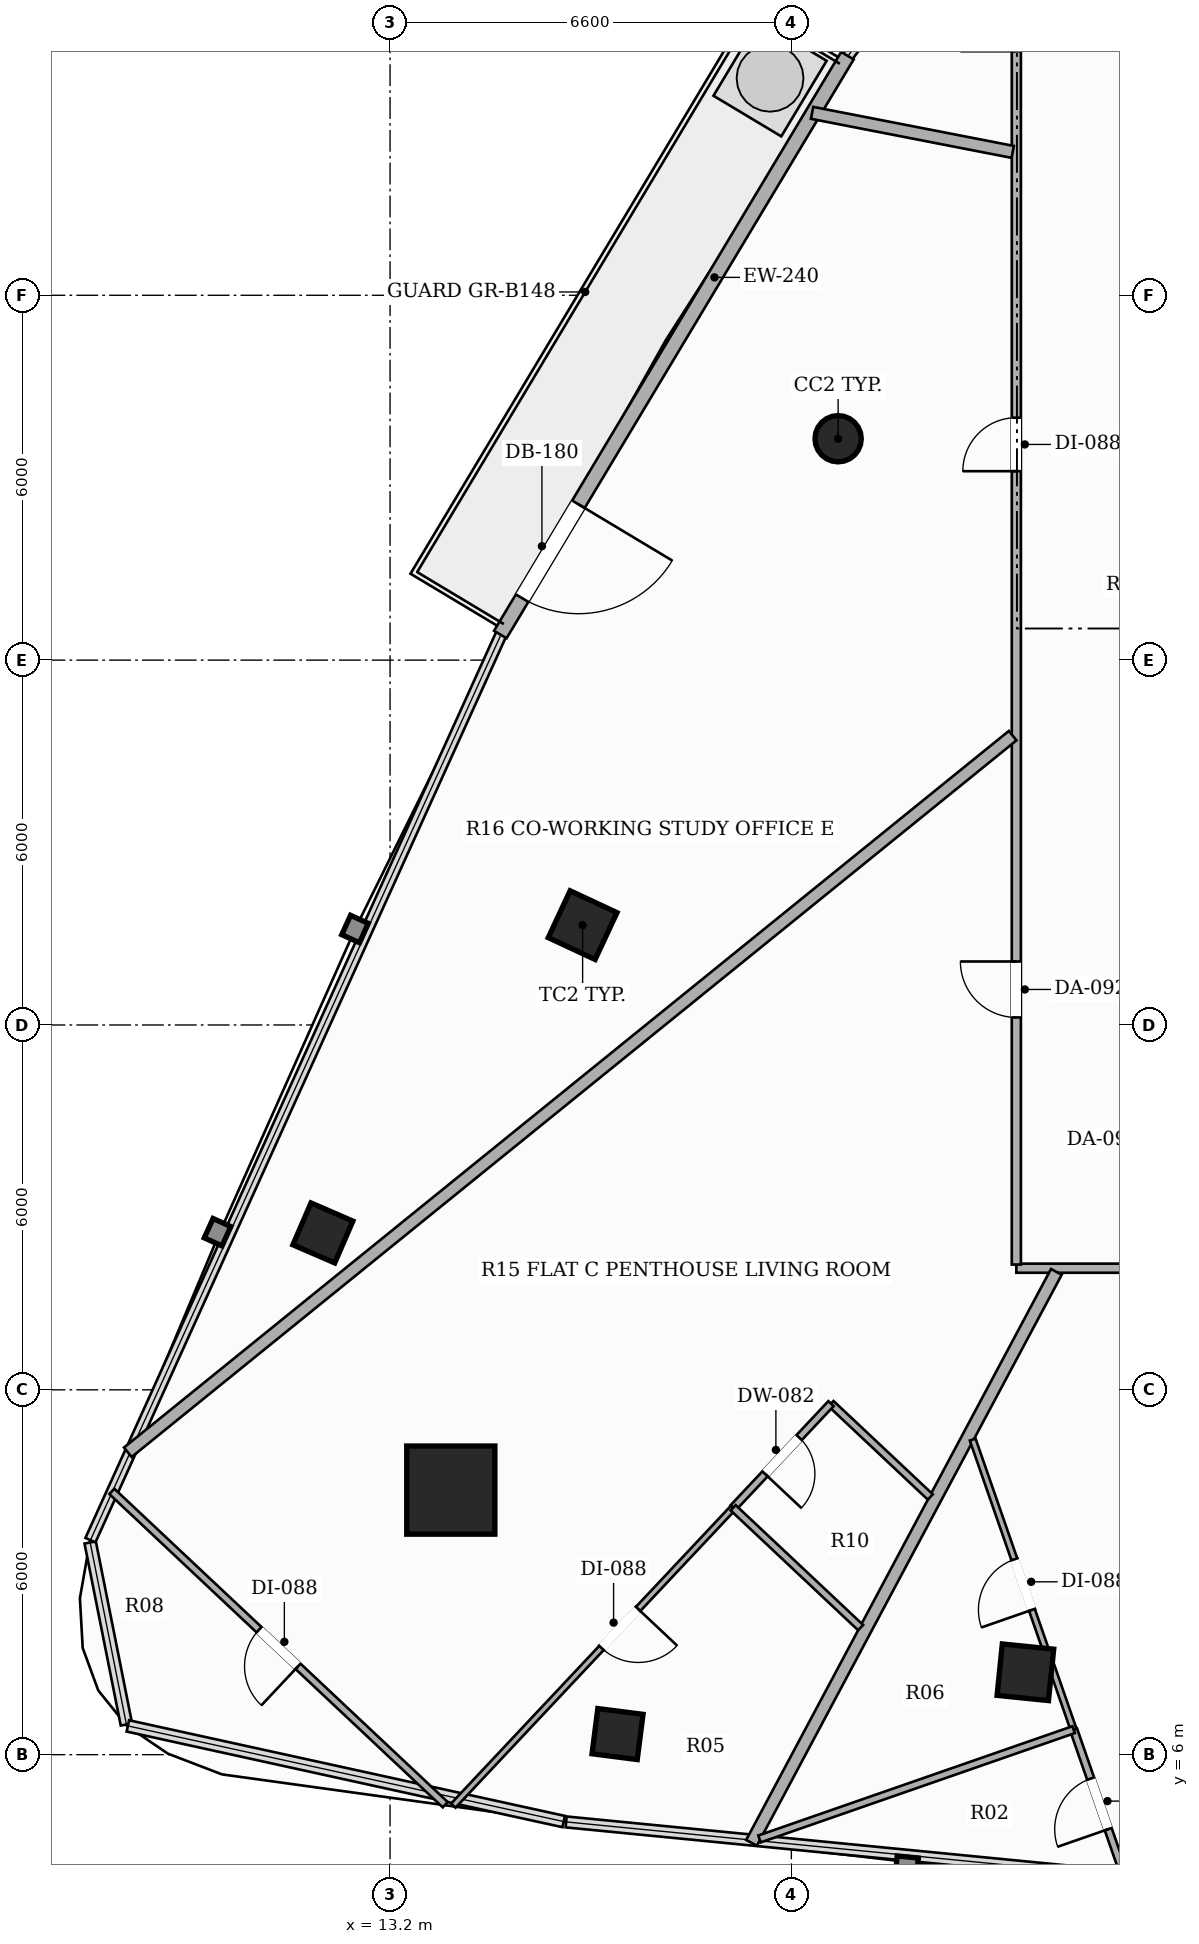
"""IFC4 building model, lengths in metres.
Left out: names, types, materials, properties, quantities, classifications, styles, units other than length and angle.
Written with IfcOpenShell. Run it as: python <this file> out.ifc"""

import sys

from ifc_helpers import new_model, si_unit, direction, frame, frame_2d, origin, origin_2d, place, context, subcontext, project, spatial, rectangle, hollow_rectangle, hollow_circle, extrude, element, fill, save


model = new_model("IFC4")
c1 = context("Model", 3, precision=1e-05, world=origin(), true_north=direction((0.0, 1.0)))
c2 = subcontext(c1, "Body", "Model", "MODEL_VIEW")
j1 = project(units=[si_unit("LENGTHUNIT", "METRE"), si_unit("PLANEANGLEUNIT", "RADIAN")], contexts=[c1])
p1 = place(None, origin())
s1 = spatial("IfcSite", under=j1, at=p1, CompositionType="ELEMENT")
p2 = place(p1, origin())
s2 = spatial("IfcBuilding", under=s1, at=p2, CompositionType="ELEMENT")
p3 = place(p2, frame((0.0, 0.0, 163.85)))
s3 = spatial("IfcBuildingStorey", under=s2, at=p3, CompositionType="ELEMENT", Elevation=163.85)
p4 = place(p3, frame((14.199, 10.351, 0.0), z_axis=(0.0, 0.0, 1.0), x_axis=(1.0, 0.0, 0.0)))
e1 = element("IfcColumn", 1, at=p4, inside=s3, PredefinedType="COLUMN", context=c2, shape_type="SweptSolid", body=[
    extrude(hollow_rectangle(XDim=1.45, YDim=1.45, WallThickness=0.045, at=origin_2d()), origin(), (0.0, 0.0, 1.0), 3.3),
])
p5 = place(p3, frame((20.569, 27.641, 0.0), z_axis=(0.0, 0.0, 1.0), x_axis=(1.0, 0.0, 0.0)))
e2 = element("IfcColumn", 2, at=p5, inside=s3, PredefinedType="COLUMN", context=c2, shape_type="SweptSolid", body=[
    extrude(hollow_circle(Radius=0.381, WallThickness=0.022, at=origin_2d()), origin(), (0.0, 0.0, 1.0), 3.3),
])
for number, where, z_axis, x_axis in (
    (3, (16.367, 19.642, 0.0), (0.0, 0.0, 1.0), (0.423, 0.906, 0.0)),
    (4, (23.649, 7.355, 0.0), (0.0, 0.0, 1.0), (-0.995, 0.101, 0.0)),
):
    element("IfcColumn", number, at=place(p3, frame(where, z_axis=z_axis, x_axis=x_axis)), inside=s3, PredefinedType="COLUMN", context=c2, shape_type="SweptSolid", body=[
        extrude(hollow_rectangle(XDim=0.85, YDim=0.85, WallThickness=0.028, at=origin_2d()), origin(), (0.0, 0.0, 1.0), 3.3),
    ])
for number, where, z_axis, x_axis in (
    (5, (12.095, 14.58, 0.0), (0.0, 0.0, 1.0), (0.397, 0.918, 0.0)),
    (6, (16.941, 6.339, 0.0), (0.0, 0.0, 1.0), (-0.992, 0.127, 0.0)),
):
    element("IfcColumn", number, at=place(p3, frame(where, z_axis=z_axis, x_axis=x_axis)), inside=s3, PredefinedType="COLUMN", context=c2, shape_type="SweptSolid", body=[
        extrude(hollow_rectangle(XDim=0.75, YDim=0.75, WallThickness=0.025, at=origin_2d()), origin(), (0.0, 0.0, 1.0), 3.3),
    ])
p6 = place(p3, frame((20.722, 33.94, 0.0), z_axis=(0.0, 0.0, 1.0), x_axis=(-0.514334017412, -0.85758994778, 0.0)))
e7 = element("IfcWall", 7, at=p6, inside=s3, PredefinedType="SOLIDWALL", context=c2, shape_type="SweptSolid", body=[
    extrude(rectangle(XDim=11.1, YDim=0.24, at=frame_2d((5.55, 0.0))), origin(), (0.0, 0.0, 1.0), 2.624),
])
p7 = place(p6, frame((8.602, 0.0, 0.0)))
e8 = element("IfcOpeningElement", 8, at=p7, cuts=e7, PredefinedType="OPENING", context=c2, shape_type="SweptSolid", body=[
    extrude(rectangle(XDim=1.8, YDim=2.2, at=frame_2d((0.9, 1.1))), frame((0.0, 0.13, 0.0), z_axis=(0.0, -1.0, 0.0), x_axis=(1.0, 0.0, 0.0)), (0.0, 0.0, 1.0), 0.26),
])
p8 = place(p3, frame((26.09, 14.0, 0.0), z_axis=(0.0, 0.0, 1.0), x_axis=(-1.0, 0.0, 0.0)))
e9 = element("IfcWall", 9, at=p8, inside=s3, PredefinedType="PARTITIONING", context=c2, shape_type="SweptSolid", body=[
    extrude(rectangle(XDim=2.59, YDim=0.15, at=frame_2d((1.295, 0.0))), origin(), (0.0, 0.0, 1.0), 2.721),
])
p9 = place(p3, frame((23.5, 14.06, 0.0), z_axis=(0.0, 0.0, 1.0), x_axis=(0.0, 1.0, 0.0)))
e10 = element("IfcWall", 10, at=p9, inside=s3, PredefinedType="PARTITIONING", context=c2, shape_type="SweptSolid", body=[
    extrude(rectangle(XDim=22.84, YDim=0.15, at=frame_2d((11.42, 0.0))), origin(), (0.0, 0.0, 1.0), 2.413),
])
p10 = place(p9, frame((4.064, 0.0, 0.0)))
e11 = element("IfcOpeningElement", 11, at=p10, cuts=e10, PredefinedType="OPENING", context=c2, shape_type="SweptSolid", body=[
    extrude(rectangle(XDim=0.92, YDim=2.15, at=frame_2d((0.46, 1.075))), frame((0.0, 0.085, 0.0), z_axis=(0.0, -1.0, 0.0), x_axis=(1.0, 0.0, 0.0)), (0.0, 0.0, 1.0), 0.17),
])
p11 = place(p9, frame((13.047, 0.0, 0.0)))
e12 = element("IfcOpeningElement", 12, at=p11, cuts=e10, PredefinedType="OPENING", context=c2, shape_type="SweptSolid", body=[
    extrude(rectangle(XDim=0.88, YDim=2.1, at=frame_2d((0.44, 1.05))), frame((0.0, 0.085, 0.0), z_axis=(0.0, -1.0, 0.0), x_axis=(1.0, 0.0, 0.0)), (0.0, 0.0, 1.0), 0.17),
])
p12 = place(p9, frame((19.953, 0.0, 0.0)))
e13 = element("IfcOpeningElement", 13, at=p12, cuts=e10, PredefinedType="OPENING", context=c2, shape_type="SweptSolid", body=[
    extrude(rectangle(XDim=0.92, YDim=2.15, at=frame_2d((0.46, 1.075))), frame((0.0, 0.085, 0.0), z_axis=(0.0, -1.0, 0.0), x_axis=(1.0, 0.0, 0.0)), (0.0, 0.0, 1.0), 0.17),
])
p13 = place(p3, frame((19.145, 4.55, 0.0), z_axis=(0.0, 0.0, 1.0), x_axis=(0.470953669838, 0.882157945533, 0.0)))
e14 = element("IfcWall", 14, at=p13, inside=s3, PredefinedType="PARTITIONING", context=c2, shape_type="SweptSolid", body=[
    extrude(rectangle(XDim=10.644, YDim=0.2, at=frame_2d((5.322, 0.0))), origin(), (0.0, 0.0, 1.0), 2.413),
])
p14 = place(p3, frame((8.887, 10.973, 0.0), z_axis=(0.0, 0.0, 1.0), x_axis=(0.777135864284, 0.629332859815, 0.0)))
e15 = element("IfcWall", 15, at=p14, inside=s3, PredefinedType="PARTITIONING", context=c2, shape_type="SweptSolid", body=[
    extrude(rectangle(XDim=18.726, YDim=0.2, at=frame_2d((9.363, 0.0))), origin(), (0.0, 0.0, 1.0), 2.413),
])
p15 = place(p3, frame((20.141, 33.0, 0.0), z_axis=(0.0, 0.0, 1.0), x_axis=(0.981579076432, -0.191056318163, 0.0)))
e16 = element("IfcWall", 16, at=p15, inside=s3, PredefinedType="PARTITIONING", context=c2, shape_type="SweptSolid", body=[
    extrude(rectangle(XDim=3.361, YDim=0.2, at=frame_2d((1.68, 0.0))), origin(), (0.0, 0.0, 1.0), 2.413),
])
p16 = place(p3, frame((25.291, 3.969, 0.0), z_axis=(0.0, 0.0, 1.0), x_axis=(-0.328440044658, 0.944524820778, 0.0)))
e17 = element("IfcWall", 17, at=p16, inside=s3, PredefinedType="PARTITIONING", context=c2, shape_type="SweptSolid", body=[
    extrude(rectangle(XDim=2.585, YDim=0.12, at=frame_2d((1.292, 0.0))), origin(), (0.0, 0.0, 1.0), 3.06),
])
p17 = place(p16, frame((0.853, 0.0, 0.0)))
e18 = element("IfcOpeningElement", 18, at=p17, cuts=e17, PredefinedType="OPENING", context=c2, shape_type="SweptSolid", body=[
    extrude(rectangle(XDim=0.88, YDim=2.1, at=frame_2d((0.44, 1.05))), frame((0.0, 0.07, 0.0), z_axis=(0.0, -1.0, 0.0), x_axis=(1.0, 0.0, 0.0)), (0.0, 0.0, 1.0), 0.14),
])
p18 = place(p3, frame((24.442, 6.411, 0.0), z_axis=(0.0, 0.0, 1.0), x_axis=(-0.328597479572, 0.944470061155, 0.0)))
e19 = element("IfcWall", 19, at=p18, inside=s3, PredefinedType="PARTITIONING", context=c2, shape_type="SweptSolid", body=[
    extrude(rectangle(XDim=5.052, YDim=0.1, at=frame_2d((2.526, 0.0))), origin(), (0.0, 0.0, 1.0), 2.413),
])
p19 = place(p18, frame((2.086, 0.0, 0.0)))
e20 = element("IfcOpeningElement", 20, at=p19, cuts=e19, PredefinedType="OPENING", context=c2, shape_type="SweptSolid", body=[
    extrude(rectangle(XDim=0.88, YDim=2.1, at=frame_2d((0.44, 1.05))), frame((0.0, 0.06, 0.0), z_axis=(0.0, -1.0, 0.0), x_axis=(1.0, 0.0, 0.0)), (0.0, 0.0, 1.0), 0.12),
])
p20 = place(p3, frame((19.276, 4.614, 0.0), z_axis=(0.0, 0.0, 1.0), x_axis=(0.944496796706, 0.328520624941, 0.0)))
e21 = element("IfcWall", 21, at=p20, inside=s3, PredefinedType="PARTITIONING", context=c2, shape_type="SweptSolid", body=[
    extrude(rectangle(XDim=5.469, YDim=0.12, at=frame_2d((2.735, 0.0))), origin(), (0.0, 0.0, 1.0), 2.619),
])
p21 = place(p3, frame((22.085, 10.238, 0.0), z_axis=(0.0, 0.0, 1.0), x_axis=(-0.728663547615, 0.684871837921, 0.0)))
e22 = element("IfcWall", 22, at=p21, inside=s3, PredefinedType="PARTITIONING", context=c2, shape_type="SweptSolid", body=[
    extrude(rectangle(XDim=2.241, YDim=0.12, at=frame_2d((1.121, 0.0))), origin(), (0.0, 0.0, 1.0), 2.721),
])
p22 = place(p3, frame((20.452, 11.773, 0.0), z_axis=(0.0, 0.0, 1.0), x_axis=(-0.684631978878, -0.728888917118, 0.0)))
e23 = element("IfcWall", 23, at=p22, inside=s3, PredefinedType="PARTITIONING", context=c2, shape_type="SweptSolid", body=[
    extrude(rectangle(XDim=2.35, YDim=0.12, at=frame_2d((1.175, 0.0))), origin(), (0.0, 0.0, 1.0), 2.721),
])
p23 = place(p22, frame((0.765, 0.0, 0.0)))
e24 = element("IfcOpeningElement", 24, at=p23, cuts=e23, PredefinedType="OPENING", context=c2, shape_type="SweptSolid", body=[
    extrude(rectangle(XDim=0.82, YDim=2.1, at=frame_2d((0.41, 1.05))), frame((0.0, 0.07, 0.0), z_axis=(0.0, -1.0, 0.0), x_axis=(1.0, 0.0, 0.0)), (0.0, 0.0, 1.0), 0.14),
])
p24 = place(p3, frame((14.108, 5.177, 0.0), z_axis=(0.0, 0.0, 1.0), x_axis=(-0.728745526687, 0.684784606525, 0.0)))
e25 = element("IfcWall", 25, at=p24, inside=s3, PredefinedType="PARTITIONING", context=c2, shape_type="SweptSolid", body=[
    extrude(rectangle(XDim=7.525, YDim=0.12, at=frame_2d((3.763, 0.0))), origin(), (0.0, 0.0, 1.0), 3.06),
])
p25 = place(p24, frame((3.323, 0.0, 0.0)))
e26 = element("IfcOpeningElement", 26, at=p25, cuts=e25, PredefinedType="OPENING", context=c2, shape_type="SweptSolid", body=[
    extrude(rectangle(XDim=0.88, YDim=2.1, at=frame_2d((0.44, 1.05))), frame((0.0, 0.07, 0.0), z_axis=(0.0, -1.0, 0.0), x_axis=(1.0, 0.0, 0.0)), (0.0, 0.0, 1.0), 0.14),
])
p26 = place(p3, frame((18.843, 10.06, 0.0), z_axis=(0.0, 0.0, 1.0), x_axis=(-0.6848274704, -0.728705246163, 0.0)))
e27 = element("IfcWall", 27, at=p26, inside=s3, PredefinedType="PARTITIONING", context=c2, shape_type="SweptSolid", body=[
    extrude(rectangle(XDim=6.721, YDim=0.1, at=frame_2d((3.361, 0.0))), origin(), (0.0, 0.0, 1.0), 2.413),
])
p27 = place(p26, frame((2.283, 0.0, 0.0)))
e28 = element("IfcOpeningElement", 28, at=p27, cuts=e27, PredefinedType="OPENING", context=c2, shape_type="SweptSolid", body=[
    extrude(rectangle(XDim=0.88, YDim=2.1, at=frame_2d((0.44, 1.05))), frame((0.0, 0.06, 0.0), z_axis=(0.0, -1.0, 0.0), x_axis=(1.0, 0.0, 0.0)), (0.0, 0.0, 1.0), 0.12),
])
p28 = place(p3, frame((20.939, 8.09, 0.0), z_axis=(0.0, 0.0, 1.0), x_axis=(-0.728665789254, 0.68486945294, 0.0)))
e29 = element("IfcWall", 29, at=p28, inside=s3, PredefinedType="PARTITIONING", context=c2, shape_type="SweptSolid", body=[
    extrude(rectangle(XDim=2.876, YDim=0.12, at=frame_2d((1.438, 0.0))), origin(), (0.0, 0.0, 1.0), 2.721),
])
p29 = place(p7, origin())
e30 = element("IfcDoor", 30, at=p29, inside=s3, OperationType="SINGLE_SWING_LEFT", PredefinedType="DOOR", context=c2, shape_type="SweptSolid", body=[
    extrude(rectangle(XDim=1.8, YDim=2.2, at=frame_2d((0.9, 1.1))), frame((0.0, 0.025, 0.0), z_axis=(0.0, -1.0, 0.0), x_axis=(1.0, 0.0, 0.0)), (0.0, 0.0, 1.0), 0.05),
])
fill(e8, e30)
p30 = place(p17, origin())
e31 = element("IfcDoor", 31, at=p30, inside=s3, OperationType="SINGLE_SWING_LEFT", PredefinedType="DOOR", context=c2, shape_type="SweptSolid", body=[
    extrude(rectangle(XDim=0.88, YDim=2.1, at=frame_2d((0.44, 1.05))), frame((0.0, 0.025, 0.0), z_axis=(0.0, -1.0, 0.0), x_axis=(1.0, 0.0, 0.0)), (0.0, 0.0, 1.0), 0.05),
])
fill(e18, e31)
p31 = place(p19, origin())
e32 = element("IfcDoor", 32, at=p31, inside=s3, OperationType="SINGLE_SWING_LEFT", PredefinedType="DOOR", context=c2, shape_type="SweptSolid", body=[
    extrude(rectangle(XDim=0.88, YDim=2.1, at=frame_2d((0.44, 1.05))), frame((0.0, 0.025, 0.0), z_axis=(0.0, -1.0, 0.0), x_axis=(1.0, 0.0, 0.0)), (0.0, 0.0, 1.0), 0.05),
])
fill(e20, e32)
p32 = place(p10, origin())
e33 = element("IfcDoor", 33, at=p32, inside=s3, OperationType="SINGLE_SWING_RIGHT", PredefinedType="DOOR", context=c2, shape_type="SweptSolid", body=[
    extrude(rectangle(XDim=0.92, YDim=2.15, at=frame_2d((0.46, 1.075))), frame((0.0, 0.025, 0.0), z_axis=(0.0, -1.0, 0.0), x_axis=(1.0, 0.0, 0.0)), (0.0, 0.0, 1.0), 0.05),
])
fill(e11, e33)
p33 = place(p23, origin())
e34 = element("IfcDoor", 34, at=p33, inside=s3, OperationType="SINGLE_SWING_RIGHT", PredefinedType="DOOR", context=c2, shape_type="SweptSolid", body=[
    extrude(rectangle(XDim=0.82, YDim=2.1, at=frame_2d((0.41, 1.05))), frame((0.0, 0.025, 0.0), z_axis=(0.0, -1.0, 0.0), x_axis=(1.0, 0.0, 0.0)), (0.0, 0.0, 1.0), 0.05),
])
fill(e24, e34)
p34 = place(p25, origin())
e35 = element("IfcDoor", 35, at=p34, inside=s3, OperationType="SINGLE_SWING_LEFT", PredefinedType="DOOR", context=c2, shape_type="SweptSolid", body=[
    extrude(rectangle(XDim=0.88, YDim=2.1, at=frame_2d((0.44, 1.05))), frame((0.0, 0.025, 0.0), z_axis=(0.0, -1.0, 0.0), x_axis=(1.0, 0.0, 0.0)), (0.0, 0.0, 1.0), 0.05),
])
fill(e26, e35)
p35 = place(p27, origin())
e36 = element("IfcDoor", 36, at=p35, inside=s3, OperationType="SINGLE_SWING_LEFT", PredefinedType="DOOR", context=c2, shape_type="SweptSolid", body=[
    extrude(rectangle(XDim=0.88, YDim=2.1, at=frame_2d((0.44, 1.05))), frame((0.0, 0.025, 0.0), z_axis=(0.0, -1.0, 0.0), x_axis=(1.0, 0.0, 0.0)), (0.0, 0.0, 1.0), 0.05),
])
fill(e28, e36)
p36 = place(p11, origin())
e37 = element("IfcDoor", 37, at=p36, inside=s3, OperationType="SINGLE_SWING_LEFT", PredefinedType="DOOR", context=c2, shape_type="SweptSolid", body=[
    extrude(rectangle(XDim=0.88, YDim=2.1, at=frame_2d((0.44, 1.05))), frame((0.0, 0.025, 0.0), z_axis=(0.0, -1.0, 0.0), x_axis=(1.0, 0.0, 0.0)), (0.0, 0.0, 1.0), 0.05),
])
fill(e12, e37)
save(model, sys.argv[1])
